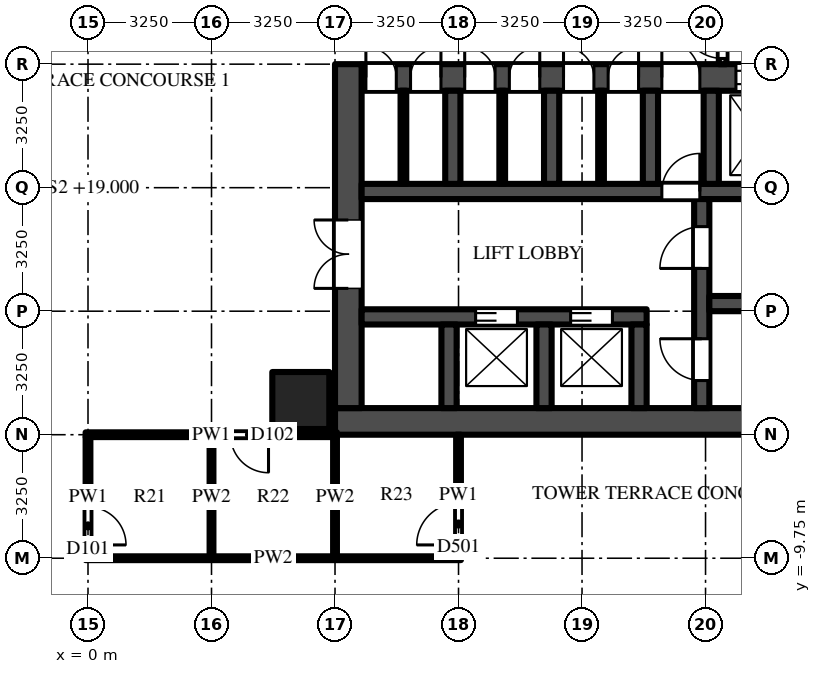
"""IFC4 building model, lengths in metres.
Left out: names, types, materials, properties, quantities, classifications, styles, units other than length and angle.
Written with IfcOpenShell. Run it as: python <this file> out.ifc"""

import sys

from ifc_helpers import new_model, si_unit, direction, frame, frame_2d, origin, origin_2d, place, context, subcontext, project, spatial, rectangle, extrude, source, transform, mapped, element, fill, save


model = new_model("IFC4")
c1 = context("Model", 3, precision=1e-05, world=origin(), true_north=direction((0.0, 1.0)))
c2 = subcontext(c1, "Body", "Model", "MODEL_VIEW")
j1 = project(units=[si_unit("LENGTHUNIT", "METRE"), si_unit("PLANEANGLEUNIT", "RADIAN")], contexts=[c1])
p1 = place(None, origin())
s1 = spatial("IfcSite", under=j1, at=p1, CompositionType="ELEMENT")
p2 = place(p1, origin())
s2 = spatial("IfcBuilding", under=s1, at=p2, CompositionType="ELEMENT")
p3 = place(p2, frame((0.0, 0.0, 19.0)))
s3 = spatial("IfcBuildingStorey", under=s2, at=p3, CompositionType="ELEMENT", Elevation=19.0)
m1 = source(origin(), c2, "Body", "SweptSolid", [
    extrude(rectangle(XDim=1.5, YDim=1.5, at=origin_2d()), origin(), (0.0, 0.0, 1.0), 5.0),
])
p4 = place(p3, frame((5.6, -5.6, 0.0), z_axis=(0.0, 0.0, 1.0), x_axis=(1.0, 0.0, 0.0)))
e1 = element("IfcColumn", 1, at=p4, inside=s3, PredefinedType="COLUMN", context=c2, shape_type="MappedRepresentation", body=[
    mapped(m1, transform((0.0, 0.0, 0.0))),
])
m2 = source(origin(), c2, "Body", "SweptSolid", [
    extrude(rectangle(XDim=16.25, YDim=0.7, at=frame_2d((8.125, 0.0))), origin(), (0.0, 0.0, 1.0), 4.7),
])
p5 = place(p3, frame((6.5, -6.15, 0.0), z_axis=(0.0, 0.0, 1.0), x_axis=(1.0, 0.0, 0.0)))
e2 = element("IfcWall", 2, at=p5, inside=s3, PredefinedType="SHEAR", context=c2, shape_type="MappedRepresentation", body=[
    mapped(m2, transform((0.0, 0.0, 0.0))),
])
m3 = source(origin(), c2, "Body", "SweptSolid", [
    extrude(rectangle(XDim=14.85, YDim=0.7, at=frame_2d((7.425, 0.0))), origin(), (0.0, 0.0, 1.0), 4.7),
])
p6 = place(p3, frame((7.2, 2.9, 0.0), z_axis=(0.0, 0.0, 1.0), x_axis=(1.0, 0.0, 0.0)))
e3 = element("IfcWall", 3, at=p6, inside=s3, PredefinedType="SHEAR", context=c2, shape_type="MappedRepresentation", body=[
    mapped(m3, transform((0.0, 0.0, 0.0))),
])
m4 = source(origin(), c2, "Body", "SweptSolid", [
    extrude(rectangle(XDim=1.3, YDim=2.1, at=frame_2d((0.65, 1.05))), frame((0.0, 0.36, 0.0), z_axis=(0.0, -1.0, 0.0), x_axis=(1.0, 0.0, 0.0)), (0.0, 0.0, 1.0), 0.72),
])
p7 = place(p6, frame((12.2, 0.0, 0.0)))
e4 = element("IfcOpeningElement", 4, at=p7, cuts=e3, PredefinedType="OPENING", context=c2, shape_type="MappedRepresentation", body=[
    mapped(m4, transform((0.0, 0.0, 0.0))),
])
m5 = source(origin(), c2, "Body", "SweptSolid", [
    extrude(rectangle(XDim=1.2, YDim=2.1, at=frame_2d((0.6, 1.05))), frame((0.0, 0.36, 0.0), z_axis=(0.0, -1.0, 0.0), x_axis=(1.0, 0.0, 0.0)), (0.0, 0.0, 1.0), 0.72),
])
p8 = place(p6, frame((9.85, 0.0, 0.0)))
e5 = element("IfcOpeningElement", 5, at=p8, cuts=e3, PredefinedType="OPENING", context=c2, shape_type="MappedRepresentation", body=[
    mapped(m5, transform((0.0, 0.0, 0.0))),
])
m6 = source(origin(), c2, "Body", "SweptSolid", [
    extrude(rectangle(XDim=1.0, YDim=2.1, at=frame_2d((0.5, 1.05))), frame((0.0, 0.36, 0.0), z_axis=(0.0, -1.0, 0.0), x_axis=(1.0, 0.0, 0.0)), (0.0, 0.0, 1.0), 0.72),
])
p9 = place(p6, frame((7.9, 0.0, 0.0)))
e6 = element("IfcOpeningElement", 6, at=p9, cuts=e3, PredefinedType="OPENING", context=c2, shape_type="MappedRepresentation", body=[
    mapped(m6, transform((0.0, 0.0, 0.0))),
])
m7 = source(origin(), c2, "Body", "SweptSolid", [
    extrude(rectangle(XDim=0.8, YDim=2.1, at=frame_2d((0.4, 1.05))), frame((0.0, 0.36, 0.0), z_axis=(0.0, -1.0, 0.0), x_axis=(1.0, 0.0, 0.0)), (0.0, 0.0, 1.0), 0.72),
])
p10 = place(p6, frame((0.113, 0.0, 0.0)))
e7 = element("IfcOpeningElement", 7, at=p10, cuts=e3, PredefinedType="OPENING", context=c2, shape_type="MappedRepresentation", body=[
    mapped(m7, transform((0.0, 0.0, 0.0))),
])
p11 = place(p6, frame((1.288, 0.0, 0.0)))
e8 = element("IfcOpeningElement", 8, at=p11, cuts=e3, PredefinedType="OPENING", context=c2, shape_type="MappedRepresentation", body=[
    mapped(m7, transform((0.0, 0.0, 0.0))),
])
p12 = place(p6, frame((2.712, 0.0, 0.0)))
e9 = element("IfcOpeningElement", 9, at=p12, cuts=e3, PredefinedType="OPENING", context=c2, shape_type="MappedRepresentation", body=[
    mapped(m7, transform((0.0, 0.0, 0.0))),
])
p13 = place(p6, frame((3.887, 0.0, 0.0)))
e10 = element("IfcOpeningElement", 10, at=p13, cuts=e3, PredefinedType="OPENING", context=c2, shape_type="MappedRepresentation", body=[
    mapped(m7, transform((0.0, 0.0, 0.0))),
])
p14 = place(p6, frame((5.312, 0.0, 0.0)))
e11 = element("IfcOpeningElement", 11, at=p14, cuts=e3, PredefinedType="OPENING", context=c2, shape_type="MappedRepresentation", body=[
    mapped(m7, transform((0.0, 0.0, 0.0))),
])
p15 = place(p6, frame((6.488, 0.0, 0.0)))
e12 = element("IfcOpeningElement", 12, at=p15, cuts=e3, PredefinedType="OPENING", context=c2, shape_type="MappedRepresentation", body=[
    mapped(m7, transform((0.0, 0.0, 0.0))),
])
m8 = source(origin(), c2, "Body", "SweptSolid", [
    extrude(rectangle(XDim=9.05, YDim=0.7, at=frame_2d((4.525, 0.0))), origin(), (0.0, 0.0, 1.0), 4.7),
])
p16 = place(p3, frame((6.85, -5.8, 0.0), z_axis=(0.0, 0.0, 1.0), x_axis=(0.0, 1.0, 0.0)))
e13 = element("IfcWall", 13, at=p16, inside=s3, PredefinedType="SHEAR", context=c2, shape_type="MappedRepresentation", body=[
    mapped(m8, transform((0.0, 0.0, 0.0))),
])
m9 = source(origin(), c2, "Body", "SweptSolid", [
    extrude(rectangle(XDim=1.8, YDim=2.1, at=frame_2d((0.9, 1.05))), frame((0.0, 0.36, 0.0), z_axis=(0.0, -1.0, 0.0), x_axis=(1.0, 0.0, 0.0)), (0.0, 0.0, 1.0), 0.72),
])
p17 = place(p16, frame((3.15, 0.0, 0.0)))
e14 = element("IfcOpeningElement", 14, at=p17, cuts=e13, PredefinedType="OPENING", context=c2, shape_type="MappedRepresentation", body=[
    mapped(m9, transform((0.0, 0.0, 0.0))),
])
m10 = source(origin(), c2, "Body", "SweptSolid", [
    extrude(rectangle(XDim=7.5, YDim=0.4, at=frame_2d((3.75, 0.0))), origin(), (0.0, 0.0, 1.0), 4.7),
])
p18 = place(p3, frame((7.2, -3.4, 0.0), z_axis=(0.0, 0.0, 1.0), x_axis=(1.0, 0.0, 0.0)))
e15 = element("IfcWall", 15, at=p18, inside=s3, PredefinedType="SHEAR", context=c2, shape_type="MappedRepresentation", body=[
    mapped(m10, transform((0.0, 0.0, 0.0))),
])
m11 = source(origin(), c2, "Body", "SweptSolid", [
    extrude(rectangle(XDim=1.1, YDim=2.1, at=frame_2d((0.55, 1.05))), frame((0.0, 0.21, 0.0), z_axis=(0.0, -1.0, 0.0), x_axis=(1.0, 0.0, 0.0)), (0.0, 0.0, 1.0), 0.42),
])
p19 = place(p18, frame((3.0, 0.0, 0.0)))
e16 = element("IfcOpeningElement", 16, at=p19, cuts=e15, PredefinedType="OPENING", context=c2, shape_type="MappedRepresentation", body=[
    mapped(m11, transform((0.0, 0.0, 0.0))),
])
p20 = place(p18, frame((5.5, 0.0, 0.0)))
e17 = element("IfcOpeningElement", 17, at=p20, cuts=e15, PredefinedType="OPENING", context=c2, shape_type="MappedRepresentation", body=[
    mapped(m11, transform((0.0, 0.0, 0.0))),
])
m12 = source(origin(), c2, "Body", "SweptSolid", [
    extrude(rectangle(XDim=14.85, YDim=0.4, at=frame_2d((7.425, 0.0))), origin(), (0.0, 0.0, 1.0), 4.7),
])
p21 = place(p3, frame((7.2, -0.1, 0.0), z_axis=(0.0, 0.0, 1.0), x_axis=(1.0, 0.0, 0.0)))
e18 = element("IfcWall", 18, at=p21, inside=s3, PredefinedType="SHEAR", context=c2, shape_type="MappedRepresentation", body=[
    mapped(m12, transform((0.0, 0.0, 0.0))),
])
m13 = source(origin(), c2, "Body", "SweptSolid", [
    extrude(rectangle(XDim=1.0, YDim=2.1, at=frame_2d((0.5, 1.05))), frame((0.0, 0.21, 0.0), z_axis=(0.0, -1.0, 0.0), x_axis=(1.0, 0.0, 0.0)), (0.0, 0.0, 1.0), 0.42),
])
p22 = place(p21, frame((7.9, 0.0, 0.0)))
e19 = element("IfcOpeningElement", 19, at=p22, cuts=e18, PredefinedType="OPENING", context=c2, shape_type="MappedRepresentation", body=[
    mapped(m13, transform((0.0, 0.0, 0.0))),
])
m14 = source(origin(), c2, "Body", "SweptSolid", [
    extrude(rectangle(XDim=5.5, YDim=0.4, at=frame_2d((2.75, 0.0))), origin(), (0.0, 0.0, 1.0), 4.7),
])
p23 = place(p3, frame((16.15, -5.8, 0.0), z_axis=(0.0, 0.0, 1.0), x_axis=(0.0, 1.0, 0.0)))
e20 = element("IfcWall", 20, at=p23, inside=s3, PredefinedType="SHEAR", context=c2, shape_type="MappedRepresentation", body=[
    mapped(m14, transform((0.0, 0.0, 0.0))),
])
p24 = place(p23, frame((0.725, 0.0, 0.0)))
e21 = element("IfcOpeningElement", 21, at=p24, cuts=e20, PredefinedType="OPENING", context=c2, shape_type="MappedRepresentation", body=[
    mapped(m11, transform((0.0, 0.0, 0.0))),
])
p25 = place(p23, frame((3.675, 0.0, 0.0)))
e22 = element("IfcOpeningElement", 22, at=p25, cuts=e20, PredefinedType="OPENING", context=c2, shape_type="MappedRepresentation", body=[
    mapped(m11, transform((0.0, 0.0, 0.0))),
])
m15 = source(origin(), c2, "Body", "SweptSolid", [
    extrude(rectangle(XDim=5.7, YDim=0.4, at=frame_2d((2.85, 0.0))), origin(), (0.0, 0.0, 1.0), 4.7),
])
p26 = place(p3, frame((16.35, -3.05, 0.0), z_axis=(0.0, 0.0, 1.0), x_axis=(1.0, 0.0, 0.0)))
e23 = element("IfcWall", 23, at=p26, inside=s3, PredefinedType="SHEAR", context=c2, shape_type="MappedRepresentation", body=[
    mapped(m15, transform((0.0, 0.0, 0.0))),
])
m16 = source(origin(), c2, "Body", "SweptSolid", [
    extrude(rectangle(XDim=2.2, YDim=0.4, at=frame_2d((1.1, 0.0))), origin(), (0.0, 0.0, 1.0), 4.7),
])
for number, where, z_axis, x_axis in (
    (24, (9.5, -5.8, 0.0), (0.0, 0.0, 1.0), (0.0, 1.0, 0.0)),
    (25, (12.0, -5.8, 0.0), (0.0, 0.0, 1.0), (0.0, 1.0, 0.0)),
    (26, (14.5, -5.8, 0.0), (0.0, 0.0, 1.0), (0.0, 1.0, 0.0)),
):
    element("IfcWall", number, at=place(p3, frame(where, z_axis=z_axis, x_axis=x_axis)), inside=s3, PredefinedType="SHEAR", context=c2, shape_type="MappedRepresentation", body=[
        mapped(m16, transform((0.0, 0.0, 0.0))),
    ])
m17 = source(origin(), c2, "Body", "SweptSolid", [
    extrude(rectangle(XDim=2.45, YDim=0.4, at=frame_2d((1.225, 0.0))), origin(), (0.0, 0.0, 1.0), 4.7),
])
for number, where, z_axis, x_axis in (
    (27, (9.6, 0.1, 0.0), (0.0, 0.0, 1.0), (0.0, 1.0, 0.0)),
    (28, (12.2, 0.1, 0.0), (0.0, 0.0, 1.0), (0.0, 1.0, 0.0)),
    (29, (14.8, 0.1, 0.0), (0.0, 0.0, 1.0), (0.0, 1.0, 0.0)),
    (30, (16.4, 0.1, 0.0), (0.0, 0.0, 1.0), (0.0, 1.0, 0.0)),
):
    element("IfcWall", number, at=place(p3, frame(where, z_axis=z_axis, x_axis=x_axis)), inside=s3, PredefinedType="SHEAR", context=c2, shape_type="MappedRepresentation", body=[
        mapped(m17, transform((0.0, 0.0, 0.0))),
    ])
m18 = source(origin(), c2, "Body", "SweptSolid", [
    extrude(rectangle(XDim=3.25, YDim=0.2, at=frame_2d((1.625, 0.0))), origin(), (0.0, 0.0, 1.0), 4.7),
])
p27 = place(p3, frame((16.7, 3.25, 0.0), z_axis=(0.0, 0.0, 1.0), x_axis=(0.0, 1.0, 0.0)))
e31 = element("IfcWall", 31, at=p27, inside=s3, PredefinedType="PARTITIONING", context=c2, shape_type="MappedRepresentation", body=[
    mapped(m18, transform((0.0, 0.0, 0.0))),
])
m19 = source(origin(), c2, "Body", "SweptSolid", [
    extrude(rectangle(XDim=1.1, YDim=2.1, at=frame_2d((0.55, 1.05))), frame((0.0, 0.11, 0.0), z_axis=(0.0, -1.0, 0.0), x_axis=(1.0, 0.0, 0.0)), (0.0, 0.0, 1.0), 0.22),
])
p28 = place(p27, frame((0.15, 0.0, 0.0)))
e32 = element("IfcOpeningElement", 32, at=p28, cuts=e31, PredefinedType="OPENING", context=c2, shape_type="MappedRepresentation", body=[
    mapped(m19, transform((0.0, 0.0, 0.0))),
])
m20 = source(origin(), c2, "Body", "SweptSolid", [
    extrude(rectangle(XDim=2.45, YDim=0.15, at=frame_2d((1.225, 0.0))), origin(), (0.0, 0.0, 1.0), 4.7),
])
for number, where, z_axis, x_axis in (
    (33, (8.3, 0.1, 0.0), (0.0, 0.0, 1.0), (0.0, 1.0, 0.0)),
    (34, (10.9, 0.1, 0.0), (0.0, 0.0, 1.0), (0.0, 1.0, 0.0)),
    (35, (13.5, 0.1, 0.0), (0.0, 0.0, 1.0), (0.0, 1.0, 0.0)),
):
    element("IfcWall", number, at=place(p3, frame(where, z_axis=z_axis, x_axis=x_axis)), inside=s3, PredefinedType="PARTITIONING", context=c2, shape_type="MappedRepresentation", body=[
        mapped(m20, transform((0.0, 0.0, 0.0))),
    ])
m21 = source(origin(), c2, "Body", "SweptSolid", [
    extrude(rectangle(XDim=3.137, YDim=0.125, at=frame_2d((1.569, 0.0))), origin(), (0.0, 0.0, 1.0), 4.077),
])
p29 = place(p3, frame((0.0, -6.562, 0.0), z_axis=(0.0, 0.0, 1.0), x_axis=(0.0, -1.0, 0.0)))
e36 = element("IfcWall", 36, at=p29, inside=s3, PredefinedType="PARTITIONING", context=c2, shape_type="MappedRepresentation", body=[
    mapped(m21, transform((0.0, 0.0, 0.0))),
])
m22 = source(origin(), c2, "Body", "SweptSolid", [
    extrude(rectangle(XDim=1.0, YDim=2.1, at=frame_2d((0.5, 1.05))), frame((0.0, 0.073, 0.0), z_axis=(0.0, -1.0, 0.0), x_axis=(1.0, 0.0, 0.0)), (0.0, 0.0, 1.0), 0.145),
])
p30 = place(p29, frame((1.837, 0.0, 0.0)))
e37 = element("IfcOpeningElement", 37, at=p30, cuts=e36, PredefinedType="OPENING", context=c2, shape_type="MappedRepresentation", body=[
    mapped(m22, transform((0.0, 0.0, 0.0))),
])
m23 = source(origin(), c2, "Body", "SweptSolid", [
    extrude(rectangle(XDim=3.137, YDim=0.1, at=frame_2d((1.569, 0.0))), origin(), (0.0, 0.0, 1.0), 4.7),
])
p31 = place(p3, frame((3.25, -9.7, 0.0), z_axis=(0.0, 0.0, 1.0), x_axis=(0.0, 1.0, 0.0)))
e38 = element("IfcWall", 38, at=p31, inside=s3, PredefinedType="PARTITIONING", context=c2, shape_type="MappedRepresentation", body=[
    mapped(m23, transform((0.0, 0.0, 0.0))),
])
m24 = source(origin(), c2, "Body", "SweptSolid", [
    extrude(rectangle(XDim=3.137, YDim=0.1, at=frame_2d((1.569, 0.0))), origin(), (0.0, 0.0, 1.0), 3.996),
])
p32 = place(p3, frame((6.5, -9.7, 0.0), z_axis=(0.0, 0.0, 1.0), x_axis=(0.0, 1.0, 0.0)))
e39 = element("IfcWall", 39, at=p32, inside=s3, PredefinedType="PARTITIONING", context=c2, shape_type="MappedRepresentation", body=[
    mapped(m24, transform((0.0, 0.0, 0.0))),
])
m25 = source(origin(), c2, "Body", "SweptSolid", [
    extrude(rectangle(XDim=3.2, YDim=0.125, at=frame_2d((1.6, 0.0))), origin(), (0.0, 0.0, 1.0), 3.996),
])
p33 = place(p3, frame((9.75, -9.7, 0.0), z_axis=(0.0, 0.0, 1.0), x_axis=(0.0, 1.0, 0.0)))
e40 = element("IfcWall", 40, at=p33, inside=s3, PredefinedType="PARTITIONING", context=c2, shape_type="MappedRepresentation", body=[
    mapped(m25, transform((0.0, 0.0, 0.0))),
])
m26 = source(origin(), c2, "Body", "SweptSolid", [
    extrude(rectangle(XDim=1.1, YDim=2.1, at=frame_2d((0.55, 1.05))), frame((0.0, 0.073, 0.0), z_axis=(0.0, -1.0, 0.0), x_axis=(1.0, 0.0, 0.0)), (0.0, 0.0, 1.0), 0.145),
])
p34 = place(p33, frame((0.3, 0.0, 0.0)))
e41 = element("IfcOpeningElement", 41, at=p34, cuts=e40, PredefinedType="OPENING", context=c2, shape_type="MappedRepresentation", body=[
    mapped(m26, transform((0.0, 0.0, 0.0))),
])
m27 = source(origin(), c2, "Body", "SweptSolid", [
    extrude(rectangle(XDim=9.875, YDim=0.1, at=frame_2d((4.938, 0.0))), origin(), (0.0, 0.0, 1.0), 3.762),
])
p35 = place(p3, frame((-0.062, -9.75, 0.0), z_axis=(0.0, 0.0, 1.0), x_axis=(1.0, 0.0, 0.0)))
e42 = element("IfcWall", 42, at=p35, inside=s3, PredefinedType="PARTITIONING", context=c2, shape_type="MappedRepresentation", body=[
    mapped(m27, transform((0.0, 0.0, 0.0))),
])
m28 = source(origin(), c2, "Body", "SweptSolid", [
    extrude(rectangle(XDim=6.613, YDim=0.125, at=frame_2d((3.306, 0.0))), origin(), (0.0, 0.0, 1.0), 3.762),
])
p36 = place(p3, frame((6.55, -6.5, 0.0), z_axis=(0.0, 0.0, 1.0), x_axis=(-1.0, 0.0, 0.0)))
e43 = element("IfcWall", 43, at=p36, inside=s3, PredefinedType="PARTITIONING", context=c2, shape_type="MappedRepresentation", body=[
    mapped(m28, transform((0.0, 0.0, 0.0))),
])
p37 = place(p36, frame((1.8, 0.0, 0.0)))
e44 = element("IfcOpeningElement", 44, at=p37, cuts=e43, PredefinedType="OPENING", context=c2, shape_type="MappedRepresentation", body=[
    mapped(m22, transform((0.0, 0.0, 0.0))),
])
m29 = source(origin(), c2, "Body", "SweptSolid", [
    extrude(rectangle(XDim=1.1, YDim=2.1, at=frame_2d((0.55, 1.05))), frame((0.0, 0.025, 0.0), z_axis=(0.0, -1.0, 0.0), x_axis=(1.0, 0.0, 0.0)), (0.0, 0.0, 1.0), 0.05),
])
p38 = place(p19, origin())
e45 = element("IfcDoor", 45, at=p38, inside=s3, OperationType="DOUBLE_DOOR_SLIDING", PredefinedType="DOOR", context=c2, shape_type="MappedRepresentation", body=[
    mapped(m29, transform((0.0, 0.0, 0.0))),
])
fill(e16, e45)
p39 = place(p20, origin())
e46 = element("IfcDoor", 46, at=p39, inside=s3, OperationType="DOUBLE_DOOR_SLIDING", PredefinedType="DOOR", context=c2, shape_type="MappedRepresentation", body=[
    mapped(m29, transform((0.0, 0.0, 0.0))),
])
fill(e17, e46)
m30 = source(origin(), c2, "Body", "SweptSolid", [
    extrude(rectangle(XDim=1.2, YDim=2.1, at=frame_2d((0.6, 1.05))), frame((0.0, -0.275, 0.0), z_axis=(0.0, -1.0, 0.0), x_axis=(1.0, 0.0, 0.0)), (0.0, 0.0, 1.0), 0.05),
])
p40 = place(p8, origin())
e47 = element("IfcDoor", 47, at=p40, inside=s3, OperationType="DOUBLE_DOOR_SLIDING", PredefinedType="DOOR", context=c2, shape_type="MappedRepresentation", body=[
    mapped(m30, transform((0.0, 0.0, 0.0))),
])
fill(e5, e47)
m31 = source(origin(), c2, "Body", "SweptSolid", [
    extrude(rectangle(XDim=1.8, YDim=2.1, at=frame_2d((0.9, 1.05))), frame((0.0, -0.275, 0.0), z_axis=(0.0, -1.0, 0.0), x_axis=(1.0, 0.0, 0.0)), (0.0, 0.0, 1.0), 0.05),
])
p41 = place(p17, origin())
e48 = element("IfcDoor", 48, at=p41, inside=s3, OperationType="DOUBLE_DOOR_SINGLE_SWING", PredefinedType="DOOR", context=c2, shape_type="MappedRepresentation", body=[
    mapped(m31, transform((0.0, 0.0, 0.0))),
])
fill(e14, e48)
p42 = place(p24, origin())
e49 = element("IfcDoor", 49, at=p42, inside=s3, OperationType="SINGLE_SWING_RIGHT", PredefinedType="DOOR", context=c2, shape_type="MappedRepresentation", body=[
    mapped(m29, transform((0.0, 0.0, 0.0))),
])
fill(e21, e49)
p43 = place(p25, origin())
e50 = element("IfcDoor", 50, at=p43, inside=s3, OperationType="SINGLE_SWING_LEFT", PredefinedType="DOOR", context=c2, shape_type="MappedRepresentation", body=[
    mapped(m29, transform((0.0, 0.0, 0.0))),
])
fill(e22, e50)
m32 = source(origin(), c2, "Body", "SweptSolid", [
    extrude(rectangle(XDim=1.0, YDim=2.1, at=frame_2d((0.5, 1.05))), frame((0.0, 0.025, 0.0), z_axis=(0.0, -1.0, 0.0), x_axis=(1.0, 0.0, 0.0)), (0.0, 0.0, 1.0), 0.05),
])
p44 = place(p22, origin())
e51 = element("IfcDoor", 51, at=p44, inside=s3, OperationType="SINGLE_SWING_RIGHT", PredefinedType="DOOR", context=c2, shape_type="MappedRepresentation", body=[
    mapped(m32, transform((0.0, 0.0, 0.0))),
])
fill(e19, e51)
m33 = source(origin(), c2, "Body", "SweptSolid", [
    extrude(rectangle(XDim=1.0, YDim=2.1, at=frame_2d((0.5, 1.05))), frame((0.0, -0.275, 0.0), z_axis=(0.0, -1.0, 0.0), x_axis=(1.0, 0.0, 0.0)), (0.0, 0.0, 1.0), 0.05),
])
p45 = place(p9, origin())
e52 = element("IfcDoor", 52, at=p45, inside=s3, OperationType="SINGLE_SWING_LEFT", PredefinedType="DOOR", context=c2, shape_type="MappedRepresentation", body=[
    mapped(m33, transform((0.0, 0.0, 0.0))),
])
fill(e6, e52)
p46 = place(p28, origin())
e53 = element("IfcDoor", 53, at=p46, inside=s3, OperationType="SINGLE_SWING_RIGHT", PredefinedType="DOOR", context=c2, shape_type="MappedRepresentation", body=[
    mapped(m29, transform((0.0, 0.0, 0.0))),
])
fill(e32, e53)
m34 = source(origin(), c2, "Body", "SweptSolid", [
    extrude(rectangle(XDim=0.8, YDim=2.1, at=frame_2d((0.4, 1.05))), frame((0.0, -0.275, 0.0), z_axis=(0.0, -1.0, 0.0), x_axis=(1.0, 0.0, 0.0)), (0.0, 0.0, 1.0), 0.05),
])
p47 = place(p10, origin())
e54 = element("IfcDoor", 54, at=p47, inside=s3, OperationType="SINGLE_SWING_LEFT", PredefinedType="DOOR", context=c2, shape_type="MappedRepresentation", body=[
    mapped(m34, transform((0.0, 0.0, 0.0))),
])
fill(e7, e54)
p48 = place(p11, origin())
e55 = element("IfcDoor", 55, at=p48, inside=s3, OperationType="SINGLE_SWING_RIGHT", PredefinedType="DOOR", context=c2, shape_type="MappedRepresentation", body=[
    mapped(m34, transform((0.0, 0.0, 0.0))),
])
fill(e8, e55)
p49 = place(p12, origin())
e56 = element("IfcDoor", 56, at=p49, inside=s3, OperationType="SINGLE_SWING_LEFT", PredefinedType="DOOR", context=c2, shape_type="MappedRepresentation", body=[
    mapped(m34, transform((0.0, 0.0, 0.0))),
])
fill(e9, e56)
p50 = place(p13, origin())
e57 = element("IfcDoor", 57, at=p50, inside=s3, OperationType="SINGLE_SWING_RIGHT", PredefinedType="DOOR", context=c2, shape_type="MappedRepresentation", body=[
    mapped(m34, transform((0.0, 0.0, 0.0))),
])
fill(e10, e57)
p51 = place(p14, origin())
e58 = element("IfcDoor", 58, at=p51, inside=s3, OperationType="SINGLE_SWING_LEFT", PredefinedType="DOOR", context=c2, shape_type="MappedRepresentation", body=[
    mapped(m34, transform((0.0, 0.0, 0.0))),
])
fill(e11, e58)
p52 = place(p15, origin())
e59 = element("IfcDoor", 59, at=p52, inside=s3, OperationType="SINGLE_SWING_RIGHT", PredefinedType="DOOR", context=c2, shape_type="MappedRepresentation", body=[
    mapped(m34, transform((0.0, 0.0, 0.0))),
])
fill(e12, e59)
p53 = place(p30, origin())
e60 = element("IfcDoor", 60, at=p53, inside=s3, OperationType="SINGLE_SWING_RIGHT", PredefinedType="DOOR", context=c2, shape_type="MappedRepresentation", body=[
    mapped(m32, transform((0.0, 0.0, 0.0))),
])
fill(e37, e60)
p54 = place(p34, origin())
e61 = element("IfcDoor", 61, at=p54, inside=s3, OperationType="SINGLE_SWING_LEFT", PredefinedType="DOOR", context=c2, shape_type="MappedRepresentation", body=[
    mapped(m29, transform((0.0, 0.0, 0.0))),
])
fill(e41, e61)
p55 = place(p37, origin())
e62 = element("IfcDoor", 62, at=p55, inside=s3, OperationType="SINGLE_SWING_LEFT", PredefinedType="DOOR", context=c2, shape_type="MappedRepresentation", body=[
    mapped(m32, transform((0.0, 0.0, 0.0))),
])
fill(e44, e62)
save(model, sys.argv[1])
